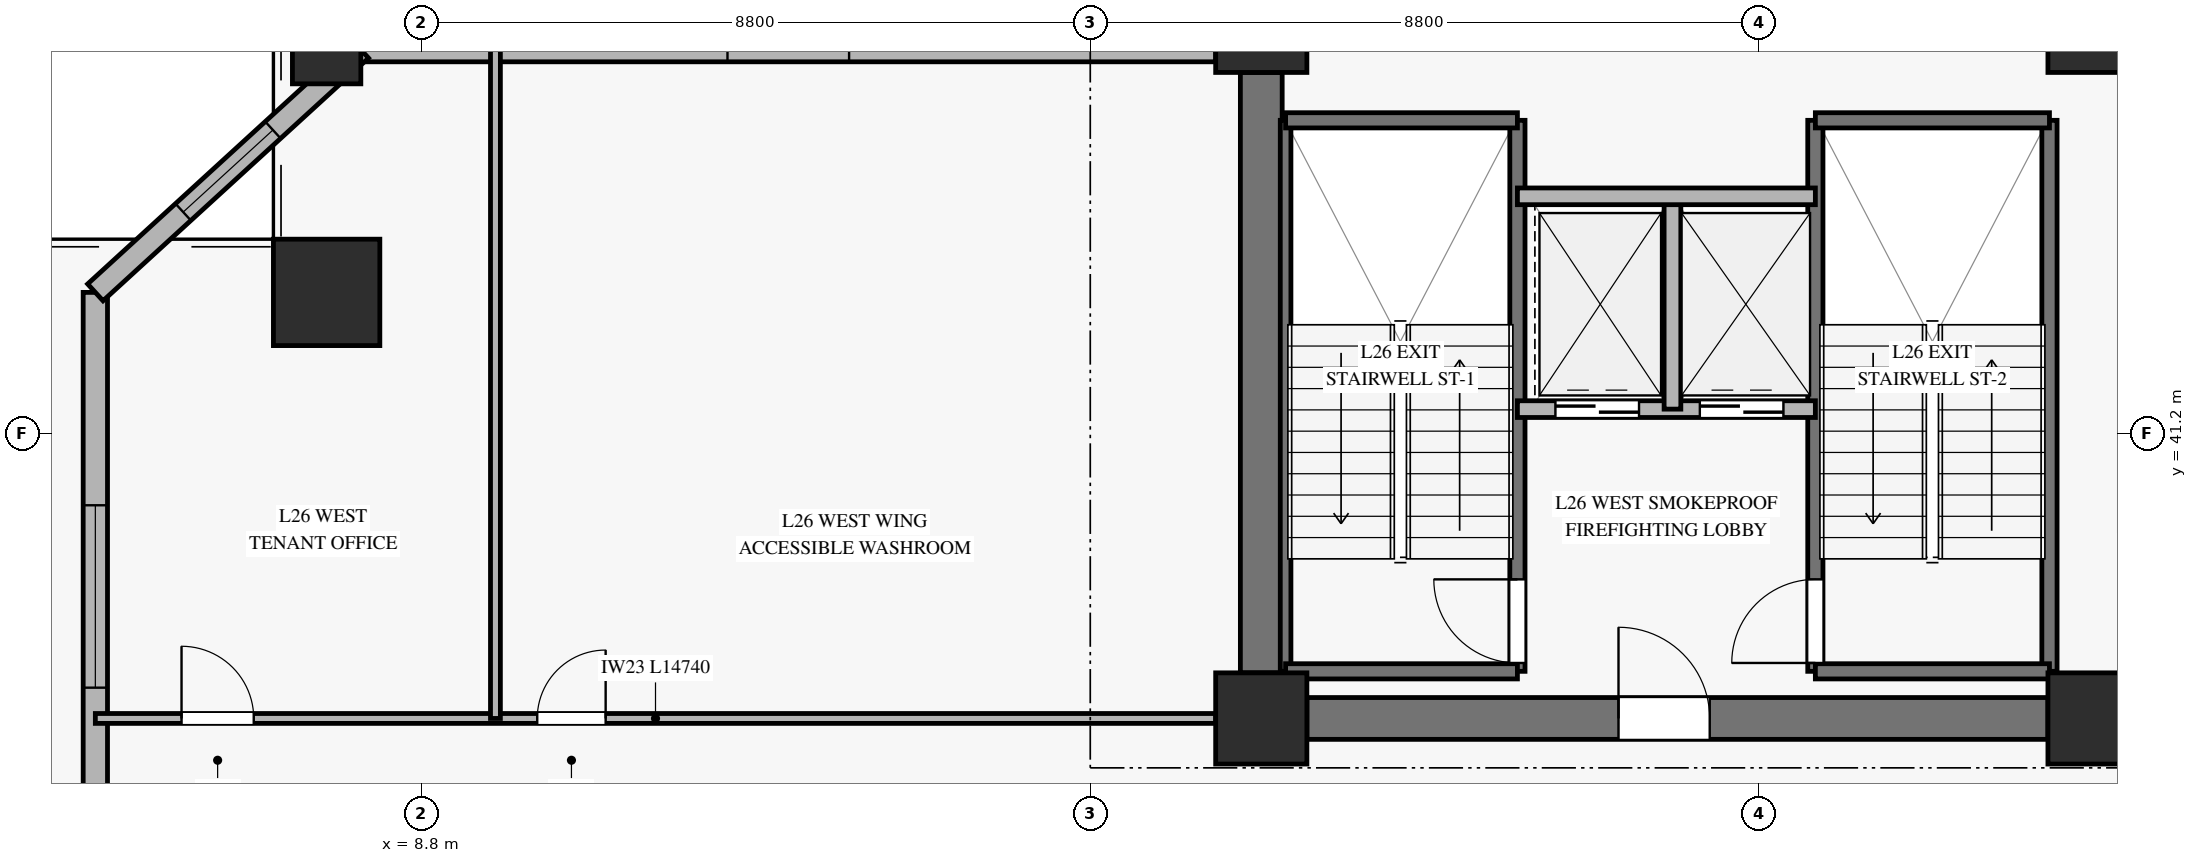
"""IFC4 building model, lengths in metres.
Left out: names, types, materials, properties, quantities, classifications, styles, units other than length and angle.
Written with IfcOpenShell. Run it as: python <this file> out.ifc"""

import sys

from ifc_helpers import new_model, si_unit, direction, frame, frame_2d, origin, origin_2d, place, context, subcontext, project, spatial, rectangle, hollow_rectangle, extrude, source, transform, mapped, element, fill, save


model = new_model("IFC4")
c1 = context("Model", 3, precision=1e-05, world=origin(), true_north=direction((0.0, 1.0)))
c2 = subcontext(c1, "Body", "Model", "MODEL_VIEW")
j1 = project(units=[si_unit("LENGTHUNIT", "METRE"), si_unit("PLANEANGLEUNIT", "RADIAN")], contexts=[c1])
p1 = place(None, origin())
s1 = spatial("IfcSite", under=j1, at=p1, CompositionType="ELEMENT")
p2 = place(p1, origin())
s2 = spatial("IfcBuilding", under=s1, at=p2, CompositionType="ELEMENT")
p3 = place(p2, frame((0.0, 0.0, 107.5)))
s3 = spatial("IfcBuildingStorey", under=s2, at=p3, CompositionType="ELEMENT", Elevation=107.5)
m1 = source(origin(), c2, "Body", "SweptSolid", [
    extrude(rectangle(XDim=1.2, YDim=1.2, at=origin_2d()), origin(), (0.0, 0.0, 1.0), 3.68),
])
for number, where, z_axis, x_axis in (
    (1, (19.85, 37.45, 0.0), (0.0, 0.0, 1.0), (1.0, 0.0, 0.0)),
    (2, (19.85, 46.55, 0.0), (0.0, 0.0, 1.0), (1.0, 0.0, 0.0)),
    (3, (30.8, 37.45, 0.0), (0.0, 0.0, 1.0), (1.0, 0.0, 0.0)),
    (4, (30.8, 46.55, 0.0), (0.0, 0.0, 1.0), (1.0, 0.0, 0.0)),
):
    element("IfcColumn", number, at=place(p3, frame(where, z_axis=z_axis, x_axis=x_axis)), inside=s3, PredefinedType="PILASTER", context=c2, shape_type="MappedRepresentation", body=[
        mapped(m1, transform((0.0, 0.0, 0.0), x_axis=(1.0, 0.0, 0.0), y_axis=(0.0, 1.0, 0.0), z_axis=(0.0, 0.0, 1.0), scale=1.0)),
    ])
p4 = place(p3, frame((20.45, 37.45, 0.0), z_axis=(0.0, 0.0, 1.0), x_axis=(1.0, 0.0, 0.0)))
e5 = element("IfcWall", 5, at=p4, inside=s3, PredefinedType="SHEAR", context=c2, shape_type="SweptSolid", body=[
    extrude(rectangle(XDim=9.75, YDim=0.55, at=frame_2d((4.875, 0.0))), origin(), (0.0, 0.0, 1.0), 3.68),
])
p5 = place(p4, frame((4.1, 0.0, 0.0)))
e6 = element("IfcOpeningElement", 6, at=p5, cuts=e5, PredefinedType="OPENING", context=c2, shape_type="SweptSolid", body=[
    extrude(rectangle(XDim=1.2, YDim=2.15, at=frame_2d((0.6, 1.075))), frame((0.0, 0.285, 0.0), z_axis=(0.0, -1.0, 0.0), x_axis=(1.0, 0.0, 0.0)), (0.0, 0.0, 1.0), 0.57),
])
p6 = place(p3, frame((19.85, 38.05, 0.0), z_axis=(0.0, 0.0, 1.0), x_axis=(0.0, 1.0, 0.0)))
e7 = element("IfcWall", 7, at=p6, inside=s3, PredefinedType="SHEAR", context=c2, shape_type="SweptSolid", body=[
    extrude(rectangle(XDim=7.9, YDim=0.55, at=frame_2d((3.95, 0.0))), origin(), (0.0, 0.0, 1.0), 3.68),
])
m2 = source(origin(), c2, "Body", "SweptSolid", [
    extrude(hollow_rectangle(XDim=1.4, YDim=1.4, WallThickness=0.065, at=origin_2d()), origin(), (0.0, 0.0, 1.0), 3.686),
])
p7 = place(p3, frame((7.553, 43.056, 0.0), z_axis=(0.056433302184, 0.007352225989, 0.998379300255), x_axis=(-0.129189912634, 0.991619869947, 0.0)))
e8 = element("IfcColumn", 8, at=p7, inside=s3, PredefinedType="COLUMN", context=c2, shape_type="MappedRepresentation", body=[
    mapped(m2, transform((0.0, 0.0, 0.0), x_axis=(1.0, 0.0, 0.0), y_axis=(0.0, 1.0, 0.0), z_axis=(0.0, 0.0, 1.0), scale=1.0)),
])
m3 = source(origin(), c2, "Body", "SweptSolid", [
    extrude(hollow_rectangle(XDim=0.9, YDim=0.9, WallThickness=0.04, at=origin_2d()), origin(), (0.0, 0.0, 1.0), 3.686),
])
p8 = place(p3, frame((7.553, 46.25, 0.0), z_axis=(0.056434827503, 0.0, 0.998406285159), x_axis=(0.0, 1.0, 0.0)))
e9 = element("IfcColumn", 9, at=p8, inside=s3, PredefinedType="COLUMN", context=c2, shape_type="MappedRepresentation", body=[
    mapped(m3, transform((0.0, 0.0, 0.0), x_axis=(1.0, 0.0, 0.0), y_axis=(0.0, 1.0, 0.0), z_axis=(0.0, 0.0, 1.0), scale=1.0)),
])
p9 = place(p3, frame((4.51, 26.73, 0.0), z_axis=(0.0, 0.0, 1.0), x_axis=(0.0, 1.0, 0.0)))
e10 = element("IfcWall", 10, at=p9, inside=s3, PredefinedType="SOLIDWALL", context=c2, shape_type="SweptSolid", body=[
    extrude(rectangle(XDim=16.326, YDim=0.32, at=frame_2d((8.163, 0.0))), origin(), (0.0, 0.0, 1.0), 3.16),
])
p10 = place(p9, frame((11.125, 0.0, 0.45)))
e11 = element("IfcOpeningElement", 11, at=p10, cuts=e10, PredefinedType="OPENING", context=c2, shape_type="SweptSolid", body=[
    extrude(rectangle(XDim=2.4, YDim=2.1, at=frame_2d((1.2, 1.05))), frame((0.0, 0.17, 0.0), z_axis=(0.0, -1.0, 0.0), x_axis=(1.0, 0.0, 0.0)), (0.0, 0.0, 1.0), 0.34),
])
p11 = place(p3, frame((8.003, 46.25, 0.0), z_axis=(0.0, 0.0, 1.0), x_axis=(1.0, 0.0, 0.0)))
e12 = element("IfcWall", 12, at=p11, inside=s3, PredefinedType="SOLIDWALL", context=c2, shape_type="SweptSolid", body=[
    extrude(rectangle(XDim=11.247, YDim=0.32, at=frame_2d((5.624, 0.0))), origin(), (0.0, 0.0, 1.0), 3.16),
])
p12 = place(p11, frame((4.824, 0.0, 0.45)))
e13 = element("IfcOpeningElement", 13, at=p12, cuts=e12, PredefinedType="OPENING", context=c2, shape_type="SweptSolid", body=[
    extrude(rectangle(XDim=1.6, YDim=2.0, at=frame_2d((0.8, 1.0))), frame((0.0, 0.17, 0.0), z_axis=(0.0, -1.0, 0.0), x_axis=(1.0, 0.0, 0.0)), (0.0, 0.0, 1.0), 0.34),
])
p13 = place(p3, frame((8.003, 46.25, 0.0), z_axis=(0.0, 0.0, 1.0), x_axis=(-0.737969361405, -0.674834217884, 0.0)))
e14 = element("IfcWall", 14, at=p13, inside=s3, PredefinedType="SOLIDWALL", context=c2, shape_type="SweptSolid", body=[
    extrude(rectangle(XDim=4.733, YDim=0.3, at=frame_2d((2.367, 0.0))), origin(), (0.0, 0.0, 1.0), 3.16),
])
p14 = place(p13, frame((1.567, 0.0, 0.45)))
e15 = element("IfcOpeningElement", 15, at=p14, cuts=e14, PredefinedType="OPENING", context=c2, shape_type="SweptSolid", body=[
    extrude(rectangle(XDim=1.6, YDim=2.0, at=frame_2d((0.8, 1.0))), frame((0.0, 0.16, 0.0), z_axis=(0.0, -1.0, 0.0), x_axis=(1.0, 0.0, 0.0)), (0.0, 0.0, 1.0), 0.32),
])
p15 = place(p3, frame((20.17, 38.07, 0.0), z_axis=(0.0, 0.0, 1.0), x_axis=(0.0, 1.0, 0.0)))
e16 = element("IfcWall", 16, at=p15, inside=s3, PredefinedType="SOLIDWALL", context=c2, shape_type="SweptSolid", body=[
    extrude(rectangle(XDim=7.25, YDim=0.14, at=frame_2d((3.625, 0.0))), origin(), (0.0, 0.0, 1.0), 3.9),
])
p16 = place(p3, frame((23.22, 38.07, 0.0), z_axis=(0.0, 0.0, 1.0), x_axis=(0.0, 1.0, 0.0)))
e17 = element("IfcWall", 17, at=p16, inside=s3, PredefinedType="SOLIDWALL", context=c2, shape_type="SweptSolid", body=[
    extrude(rectangle(XDim=7.25, YDim=0.2, at=frame_2d((3.625, 0.0))), origin(), (0.0, 0.0, 1.0), 3.9),
])
p17 = place(p16, frame((0.11, 0.0, 0.0)))
e18 = element("IfcOpeningElement", 18, at=p17, cuts=e17, PredefinedType="OPENING", context=c2, shape_type="SweptSolid", body=[
    extrude(rectangle(XDim=1.1, YDim=2.15, at=frame_2d((0.55, 1.075))), frame((0.0, 0.11, 0.0), z_axis=(0.0, -1.0, 0.0), x_axis=(1.0, 0.0, 0.0)), (0.0, 0.0, 1.0), 0.22),
])
for number, where, z_axis, x_axis in (
    (19, (20.17, 45.32, 0.0), (0.0, 0.0, 1.0), (1.0, 0.0, 0.0)),
    (20, (20.17, 38.07, 0.0), (0.0, 0.0, 1.0), (1.0, 0.0, 0.0)),
):
    element("IfcWall", number, at=place(p3, frame(where, z_axis=z_axis, x_axis=x_axis)), inside=s3, PredefinedType="SOLIDWALL", context=c2, shape_type="SweptSolid", body=[
        extrude(rectangle(XDim=3.05, YDim=0.2, at=frame_2d((1.525, 0.0))), origin(), (0.0, 0.0, 1.0), 3.9),
    ])
p18 = place(p3, frame((27.14, 38.07, 0.0), z_axis=(0.0, 0.0, 1.0), x_axis=(0.0, 1.0, 0.0)))
e21 = element("IfcWall", 21, at=p18, inside=s3, PredefinedType="SOLIDWALL", context=c2, shape_type="SweptSolid", body=[
    extrude(rectangle(XDim=7.25, YDim=0.2, at=frame_2d((3.625, 0.0))), origin(), (0.0, 0.0, 1.0), 3.9),
])
p19 = place(p18, frame((0.11, 0.0, 0.0)))
e22 = element("IfcOpeningElement", 22, at=p19, cuts=e21, PredefinedType="OPENING", context=c2, shape_type="SweptSolid", body=[
    extrude(rectangle(XDim=1.1, YDim=2.15, at=frame_2d((0.55, 1.075))), frame((0.0, 0.11, 0.0), z_axis=(0.0, -1.0, 0.0), x_axis=(1.0, 0.0, 0.0)), (0.0, 0.0, 1.0), 0.22),
])
p20 = place(p3, frame((30.22, 38.07, 0.0), z_axis=(0.0, 0.0, 1.0), x_axis=(0.0, 1.0, 0.0)))
e23 = element("IfcWall", 23, at=p20, inside=s3, PredefinedType="SOLIDWALL", context=c2, shape_type="SweptSolid", body=[
    extrude(rectangle(XDim=7.25, YDim=0.2, at=frame_2d((3.625, 0.0))), origin(), (0.0, 0.0, 1.0), 3.9),
])
for number, where, z_axis, x_axis in (
    (24, (27.14, 45.32, 0.0), (0.0, 0.0, 1.0), (1.0, 0.0, 0.0)),
    (25, (27.14, 38.07, 0.0), (0.0, 0.0, 1.0), (1.0, 0.0, 0.0)),
):
    element("IfcWall", number, at=place(p3, frame(where, z_axis=z_axis, x_axis=x_axis)), inside=s3, PredefinedType="SOLIDWALL", context=c2, shape_type="SweptSolid", body=[
        extrude(rectangle(XDim=3.08, YDim=0.2, at=frame_2d((1.54, 0.0))), origin(), (0.0, 0.0, 1.0), 3.9),
    ])
p21 = place(p3, frame((23.22, 41.52, 0.0), z_axis=(0.0, 0.0, 1.0), x_axis=(1.0, 0.0, 0.0)))
e26 = element("IfcWall", 26, at=p21, inside=s3, PredefinedType="SOLIDWALL", context=c2, shape_type="SweptSolid", body=[
    extrude(rectangle(XDim=3.92, YDim=0.22, at=frame_2d((1.96, 0.0))), origin(), (0.0, 0.0, 1.0), 3.68),
])
p22 = place(p21, frame((0.5, 0.0, 0.0)))
e27 = element("IfcOpeningElement", 27, at=p22, cuts=e26, PredefinedType="OPENING", context=c2, shape_type="SweptSolid", body=[
    extrude(rectangle(XDim=1.1, YDim=2.2, at=frame_2d((0.55, 1.1))), frame((0.0, 0.12, 0.0), z_axis=(0.0, -1.0, 0.0), x_axis=(1.0, 0.0, 0.0)), (0.0, 0.0, 1.0), 0.24),
])
p23 = place(p21, frame((2.4, 0.0, 0.0)))
e28 = element("IfcOpeningElement", 28, at=p23, cuts=e26, PredefinedType="OPENING", context=c2, shape_type="SweptSolid", body=[
    extrude(rectangle(XDim=1.1, YDim=2.2, at=frame_2d((0.55, 1.1))), frame((0.0, 0.12, 0.0), z_axis=(0.0, -1.0, 0.0), x_axis=(1.0, 0.0, 0.0)), (0.0, 0.0, 1.0), 0.24),
])
p24 = place(p3, frame((25.26, 41.52, 0.0), z_axis=(0.0, 0.0, 1.0), x_axis=(0.0, 1.0, 0.0)))
e29 = element("IfcWall", 29, at=p24, inside=s3, PredefinedType="SOLIDWALL", context=c2, shape_type="SweptSolid", body=[
    extrude(rectangle(XDim=2.8, YDim=0.22, at=frame_2d((1.4, 0.0))), origin(), (0.0, 0.0, 1.0), 3.68),
])
p25 = place(p3, frame((23.22, 44.32, 0.0), z_axis=(0.0, 0.0, 1.0), x_axis=(1.0, 0.0, 0.0)))
e30 = element("IfcWall", 30, at=p25, inside=s3, PredefinedType="SOLIDWALL", context=c2, shape_type="SweptSolid", body=[
    extrude(rectangle(XDim=3.92, YDim=0.22, at=frame_2d((1.96, 0.0))), origin(), (0.0, 0.0, 1.0), 3.68),
])
p26 = place(p3, frame((4.51, 37.45, 0.0), z_axis=(0.0, 0.0, 1.0), x_axis=(1.0, 0.0, 0.0)))
e31 = element("IfcWall", 31, at=p26, inside=s3, PredefinedType="PARTITIONING", context=c2, shape_type="SweptSolid", body=[
    extrude(rectangle(XDim=14.74, YDim=0.13, at=frame_2d((7.37, 0.0))), origin(), (0.0, 0.0, 1.0), 3.165),
])
p27 = place(p26, frame((1.134, 0.0, 0.0)))
e32 = element("IfcOpeningElement", 32, at=p27, cuts=e31, PredefinedType="OPENING", context=c2, shape_type="SweptSolid", body=[
    extrude(rectangle(XDim=0.95, YDim=2.1, at=frame_2d((0.475, 1.05))), frame((0.0, 0.075, 0.0), z_axis=(0.0, -1.0, 0.0), x_axis=(1.0, 0.0, 0.0)), (0.0, 0.0, 1.0), 0.15),
])
p28 = place(p26, frame((5.814, 0.0, 0.0)))
e33 = element("IfcOpeningElement", 33, at=p28, cuts=e31, PredefinedType="OPENING", context=c2, shape_type="SweptSolid", body=[
    extrude(rectangle(XDim=0.9, YDim=2.1, at=frame_2d((0.45, 1.05))), frame((0.0, 0.075, 0.0), z_axis=(0.0, -1.0, 0.0), x_axis=(1.0, 0.0, 0.0)), (0.0, 0.0, 1.0), 0.15),
])
p29 = place(p3, frame((9.774, 37.45, 0.0), z_axis=(0.0, 0.0, 1.0), x_axis=(0.0, 1.0, 0.0)))
e34 = element("IfcWall", 34, at=p29, inside=s3, PredefinedType="PARTITIONING", context=c2, shape_type="SweptSolid", body=[
    extrude(rectangle(XDim=8.8, YDim=0.13, at=frame_2d((4.4, 0.0))), origin(), (0.0, 0.0, 1.0), 3.68),
])
m4 = source(origin(), c2, "Body", "SweptSolid", [
    extrude(rectangle(XDim=2.4, YDim=2.1, at=frame_2d((1.2, 1.05))), frame((0.0, 0.03, 0.0), z_axis=(0.0, -1.0, 0.0), x_axis=(1.0, 0.0, 0.0)), (0.0, 0.0, 1.0), 0.06),
])
p30 = place(p10, origin())
e35 = element("IfcWindow", 35, at=p30, inside=s3, PartitioningType="SINGLE_PANEL", PredefinedType="WINDOW", context=c2, shape_type="MappedRepresentation", body=[
    mapped(m4, transform((0.0, 0.0, 0.0), x_axis=(1.0, 0.0, 0.0), y_axis=(0.0, 1.0, 0.0), z_axis=(0.0, 0.0, 1.0), scale=1.0)),
])
fill(e11, e35)
m5 = source(origin(), c2, "Body", "SweptSolid", [
    extrude(rectangle(XDim=1.6, YDim=2.0, at=frame_2d((0.8, 1.0))), frame((0.0, 0.03, 0.0), z_axis=(0.0, -1.0, 0.0), x_axis=(1.0, 0.0, 0.0)), (0.0, 0.0, 1.0), 0.06),
])
p31 = place(p14, origin())
e36 = element("IfcWindow", 36, at=p31, inside=s3, PartitioningType="SINGLE_PANEL", PredefinedType="WINDOW", context=c2, shape_type="MappedRepresentation", body=[
    mapped(m5, transform((0.0, 0.0, 0.0), x_axis=(1.0, 0.0, 0.0), y_axis=(0.0, 1.0, 0.0), z_axis=(0.0, 0.0, 1.0), scale=1.0)),
])
fill(e15, e36)
m6 = source(origin(), c2, "Body", "SweptSolid", [
    extrude(rectangle(XDim=1.1, YDim=2.15, at=frame_2d((0.55, 1.075))), frame((0.0, 0.025, 0.0), z_axis=(0.0, -1.0, 0.0), x_axis=(1.0, 0.0, 0.0)), (0.0, 0.0, 1.0), 0.05),
])
p32 = place(p17, origin())
e37 = element("IfcDoor", 37, at=p32, inside=s3, OperationType="SINGLE_SWING_RIGHT", PredefinedType="DOOR", context=c2, shape_type="MappedRepresentation", body=[
    mapped(m6, transform((0.0, 0.0, 0.0), x_axis=(1.0, 0.0, 0.0), y_axis=(0.0, 1.0, 0.0), z_axis=(0.0, 0.0, 1.0), scale=1.0)),
])
fill(e18, e37)
p33 = place(p19, origin())
e38 = element("IfcDoor", 38, at=p33, inside=s3, OperationType="SINGLE_SWING_LEFT", PredefinedType="DOOR", context=c2, shape_type="MappedRepresentation", body=[
    mapped(m6, transform((0.0, 0.0, 0.0), x_axis=(1.0, 0.0, 0.0), y_axis=(0.0, 1.0, 0.0), z_axis=(0.0, 0.0, 1.0), scale=1.0)),
])
fill(e22, e38)
m7 = source(origin(), c2, "Body", "SweptSolid", [
    extrude(rectangle(XDim=1.1, YDim=2.2, at=frame_2d((0.55, 1.1))), frame((0.0, 0.025, 0.0), z_axis=(0.0, -1.0, 0.0), x_axis=(1.0, 0.0, 0.0)), (0.0, 0.0, 1.0), 0.05),
])
p34 = place(p22, origin())
e39 = element("IfcDoor", 39, at=p34, inside=s3, OperationType="SLIDING_TO_LEFT", PredefinedType="DOOR", context=c2, shape_type="MappedRepresentation", body=[
    mapped(m7, transform((0.0, 0.0, 0.0), x_axis=(1.0, 0.0, 0.0), y_axis=(0.0, 1.0, 0.0), z_axis=(0.0, 0.0, 1.0), scale=1.0)),
])
fill(e27, e39)
p35 = place(p23, origin())
e40 = element("IfcDoor", 40, at=p35, inside=s3, OperationType="SLIDING_TO_LEFT", PredefinedType="DOOR", context=c2, shape_type="MappedRepresentation", body=[
    mapped(m7, transform((0.0, 0.0, 0.0), x_axis=(1.0, 0.0, 0.0), y_axis=(0.0, 1.0, 0.0), z_axis=(0.0, 0.0, 1.0), scale=1.0)),
])
fill(e28, e40)
m8 = source(origin(), c2, "Body", "SweptSolid", [
    extrude(rectangle(XDim=1.2, YDim=2.15, at=frame_2d((0.6, 1.075))), frame((0.0, 0.025, 0.0), z_axis=(0.0, -1.0, 0.0), x_axis=(1.0, 0.0, 0.0)), (0.0, 0.0, 1.0), 0.05),
])
p36 = place(p5, origin())
e41 = element("IfcDoor", 41, at=p36, inside=s3, OperationType="SINGLE_SWING_LEFT", PredefinedType="DOOR", context=c2, shape_type="MappedRepresentation", body=[
    mapped(m8, transform((0.0, 0.0, 0.0), x_axis=(1.0, 0.0, 0.0), y_axis=(0.0, 1.0, 0.0), z_axis=(0.0, 0.0, 1.0), scale=1.0)),
])
fill(e6, e41)
m9 = source(origin(), c2, "Body", "SweptSolid", [
    extrude(rectangle(XDim=0.95, YDim=2.1, at=frame_2d((0.475, 1.05))), frame((0.0, 0.025, 0.0), z_axis=(0.0, -1.0, 0.0), x_axis=(1.0, 0.0, 0.0)), (0.0, 0.0, 1.0), 0.05),
])
p37 = place(p27, origin())
e42 = element("IfcDoor", 42, at=p37, inside=s3, OperationType="SINGLE_SWING_LEFT", PredefinedType="DOOR", context=c2, shape_type="MappedRepresentation", body=[
    mapped(m9, transform((0.0, 0.0, 0.0), x_axis=(1.0, 0.0, 0.0), y_axis=(0.0, 1.0, 0.0), z_axis=(0.0, 0.0, 1.0), scale=1.0)),
])
fill(e32, e42)
m10 = source(origin(), c2, "Body", "SweptSolid", [
    extrude(rectangle(XDim=0.9, YDim=2.1, at=frame_2d((0.45, 1.05))), frame((0.0, 0.025, 0.0), z_axis=(0.0, -1.0, 0.0), x_axis=(1.0, 0.0, 0.0)), (0.0, 0.0, 1.0), 0.05),
])
p38 = place(p28, origin())
e43 = element("IfcDoor", 43, at=p38, inside=s3, OperationType="SINGLE_SWING_RIGHT", PredefinedType="DOOR", context=c2, shape_type="MappedRepresentation", body=[
    mapped(m10, transform((0.0, 0.0, 0.0), x_axis=(1.0, 0.0, 0.0), y_axis=(0.0, 1.0, 0.0), z_axis=(0.0, 0.0, 1.0), scale=1.0)),
])
fill(e33, e43)
save(model, sys.argv[1])
